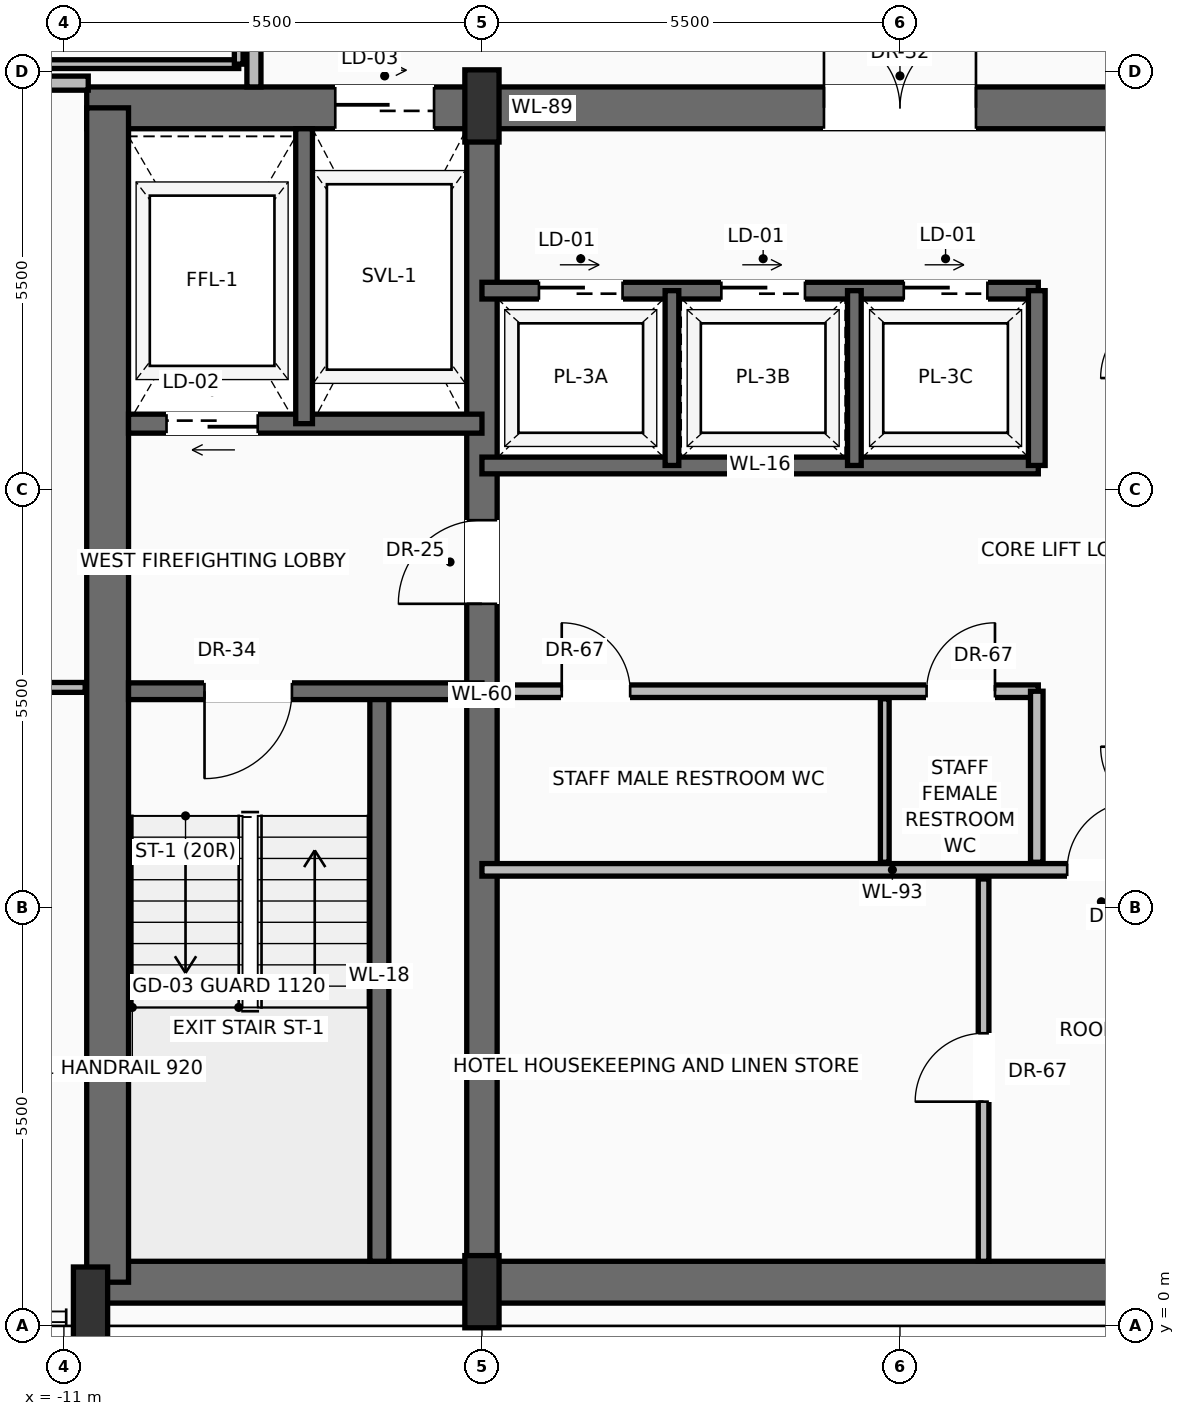
"""IFC4 building model, lengths in metres.
Left out: names, types, materials, properties, quantities, classifications, styles, units other than length and angle.
Written with IfcOpenShell. Run it as: python <this file> out.ifc"""

import sys

from ifc_helpers import new_model, si_unit, direction, frame, frame_2d, origin, origin_2d, place, context, subcontext, project, spatial, rectangle, extrude, source, transform, mapped, element, fill, save


model = new_model("IFC4")
c1 = context("Model", 3, precision=1e-05, world=origin(), true_north=direction((0.0, 1.0)))
c2 = subcontext(c1, "Body", "Model", "MODEL_VIEW")
j1 = project(units=[si_unit("LENGTHUNIT", "METRE"), si_unit("PLANEANGLEUNIT", "RADIAN")], contexts=[c1])
p1 = place(None, origin())
s1 = spatial("IfcSite", under=j1, at=p1, CompositionType="ELEMENT")
p2 = place(p1, origin())
s2 = spatial("IfcBuilding", under=s1, at=p2, CompositionType="ELEMENT")
p3 = place(p2, frame((0.0, 0.0, 223.45)))
s3 = spatial("IfcBuildingStorey", under=s2, at=p3, CompositionType="ELEMENT", Elevation=223.45)
p4 = place(p3, frame((-10.65, 0.575, 0.0), z_axis=(0.0, 0.0, 1.0), x_axis=(1.0, 0.0, 0.0)))
e1 = element("IfcWall", 1, at=p4, inside=s3, PredefinedType="SHEAR", context=c2, shape_type="SweptSolid", body=[
    extrude(rectangle(XDim=21.3, YDim=0.55, at=frame_2d((10.65, 0.0))), origin(), (0.0, 0.0, 1.0), 3.24),
])
p5 = place(p3, frame((-10.7, 16.025, 0.0), z_axis=(0.0, 0.0, 1.0), x_axis=(1.0, 0.0, 0.0)))
e2 = element("IfcWall", 2, at=p5, inside=s3, PredefinedType="SHEAR", context=c2, shape_type="SweptSolid", body=[
    extrude(rectangle(XDim=21.4, YDim=0.55, at=frame_2d((10.7, 0.0))), origin(), (0.0, 0.0, 1.0), 3.24),
])
p6 = place(p5, frame((3.27, 0.0, 0.0)))
e3 = element("IfcOpeningElement", 3, at=p6, cuts=e2, PredefinedType="OPENING", context=c2, shape_type="SweptSolid", body=[
    extrude(rectangle(XDim=1.3, YDim=2.3, at=frame_2d((0.65, 1.15))), frame((0.0, 0.285, 0.0), z_axis=(0.0, -1.0, 0.0), x_axis=(1.0, 0.0, 0.0)), (0.0, 0.0, 1.0), 0.57),
])
p7 = place(p5, frame((9.7, 0.0, 0.0)))
e4 = element("IfcOpeningElement", 4, at=p7, cuts=e2, PredefinedType="OPENING", context=c2, shape_type="SweptSolid", body=[
    extrude(rectangle(XDim=2.0, YDim=2.4, at=frame_2d((1.0, 1.2))), frame((0.0, 0.285, 0.0), z_axis=(0.0, -1.0, 0.0), x_axis=(1.0, 0.0, 0.0)), (0.0, 0.0, 1.0), 0.57),
])
p8 = place(p3, frame((-10.425, 0.575, 0.0), z_axis=(0.0, 0.0, 1.0), x_axis=(0.0, 1.0, 0.0)))
e5 = element("IfcWall", 5, at=p8, inside=s3, PredefinedType="SHEAR", context=c2, shape_type="SweptSolid", body=[
    extrude(rectangle(XDim=15.45, YDim=0.55, at=frame_2d((7.725, 0.0))), origin(), (0.0, 0.0, 1.0), 3.24),
])
p9 = place(p3, frame((-5.5, 0.575, 0.0), z_axis=(0.0, 0.0, 1.0), x_axis=(0.0, 1.0, 0.0)))
e6 = element("IfcWall", 6, at=p9, inside=s3, PredefinedType="SHEAR", context=c2, shape_type="SweptSolid", body=[
    extrude(rectangle(XDim=15.45, YDim=0.4, at=frame_2d((7.725, 0.0))), origin(), (0.0, 0.0, 1.0), 3.24),
])
p10 = place(p9, frame((8.925, 0.0, 0.0)))
e7 = element("IfcOpeningElement", 7, at=p10, cuts=e6, PredefinedType="OPENING", context=c2, shape_type="SweptSolid", body=[
    extrude(rectangle(XDim=1.1, YDim=2.2, at=frame_2d((0.55, 1.1))), frame((0.0, 0.21, 0.0), z_axis=(0.0, -1.0, 0.0), x_axis=(1.0, 0.0, 0.0)), (0.0, 0.0, 1.0), 0.42),
])
m1 = source(origin(), c2, "Body", "SweptSolid", [
    extrude(rectangle(XDim=0.45, YDim=0.95, at=origin_2d()), origin(), (0.0, 0.0, 1.0), 3.45),
])
for number, where, z_axis, x_axis in (
    (8, (-10.65, 0.3, 0.0), (0.0, 0.0, 1.0), (1.0, 0.0, 0.0)),
    (9, (-5.5, 0.45, 0.0), (0.0, 0.0, 1.0), (1.0, 0.0, 0.0)),
    (10, (-5.5, 16.05, 0.0), (0.0, 0.0, 1.0), (1.0, 0.0, 0.0)),
):
    element("IfcColumn", number, at=place(p3, frame(where, z_axis=z_axis, x_axis=x_axis)), inside=s3, PredefinedType="PILASTER", context=c2, shape_type="MappedRepresentation", body=[
        mapped(m1, transform((0.0, 0.0, 0.0), scale=1.0)),
    ])
p11 = place(p3, frame((-19.736, 15.464, 0.0), z_axis=(0.0, 0.0, 1.0), x_axis=(0.513136432844, 0.858307055364, 0.0)))
e11 = element("IfcWall", 11, at=p11, inside=s3, PredefinedType="SOLIDWALL", context=c2, shape_type="SweptSolid", body=[
    extrude(rectangle(XDim=19.37, YDim=0.28, at=frame_2d((9.685, 0.0))), origin(), (0.0, 0.0, 1.0), 2.82),
])
p12 = place(p11, frame((4.649, 0.0, 0.0)))
e12 = element("IfcOpeningElement", 12, at=p12, cuts=e11, PredefinedType="OPENING", context=c2, shape_type="SweptSolid", body=[
    extrude(rectangle(XDim=1.6, YDim=2.35, at=frame_2d((0.8, 1.175))), frame((0.0, 0.15, 0.0), z_axis=(0.0, -1.0, 0.0), x_axis=(1.0, 0.0, 0.0)), (0.0, 0.0, 1.0), 0.3),
])
p13 = place(p11, frame((13.171, 0.0, 0.9)))
e13 = element("IfcOpeningElement", 13, at=p13, cuts=e11, PredefinedType="OPENING", context=c2, shape_type="SweptSolid", body=[
    extrude(rectangle(XDim=1.55, YDim=1.75, at=frame_2d((0.775, 0.875))), frame((0.0, 0.15, 0.0), z_axis=(0.0, -1.0, 0.0), x_axis=(1.0, 0.0, 0.0)), (0.0, 0.0, 1.0), 0.3),
])
p14 = place(p3, frame((-6.85, 0.85, 0.0), z_axis=(0.0, 0.0, 1.0), x_axis=(0.0, 1.0, 0.0)))
e14 = element("IfcWall", 14, at=p14, inside=s3, PredefinedType="SOLIDWALL", context=c2, shape_type="SweptSolid", body=[
    extrude(rectangle(XDim=7.5, YDim=0.25, at=frame_2d((3.75, 0.0))), origin(), (0.0, 0.0, 1.0), 3.24),
])
p15 = place(p3, frame((-5.5, 8.35, 0.0), z_axis=(0.0, 0.0, 1.0), x_axis=(-1.0, 0.0, 0.0)))
e15 = element("IfcWall", 15, at=p15, inside=s3, PredefinedType="SOLIDWALL", context=c2, shape_type="SweptSolid", body=[
    extrude(rectangle(XDim=4.65, YDim=0.22, at=frame_2d((2.325, 0.0))), origin(), (0.0, 0.0, 1.0), 3.24),
])
p16 = place(p15, frame((2.5, 0.0, 0.0)))
e16 = element("IfcOpeningElement", 16, at=p16, cuts=e15, PredefinedType="OPENING", context=c2, shape_type="SweptSolid", body=[
    extrude(rectangle(XDim=1.15, YDim=2.2, at=frame_2d((0.575, 1.1))), frame((0.0, 0.12, 0.0), z_axis=(0.0, -1.0, 0.0), x_axis=(1.0, 0.0, 0.0)), (0.0, 0.0, 1.0), 0.24),
])
p17 = place(p3, frame((-5.5, 11.87, 0.0), z_axis=(0.0, 0.0, 1.0), x_axis=(-1.0, 0.0, 0.0)))
e17 = element("IfcWall", 17, at=p17, inside=s3, PredefinedType="SOLIDWALL", context=c2, shape_type="SweptSolid", body=[
    extrude(rectangle(XDim=4.65, YDim=0.25, at=frame_2d((2.325, 0.0))), origin(), (0.0, 0.0, 1.0), 3.24),
])
p18 = place(p17, frame((2.95, 0.0, 0.0)))
e18 = element("IfcOpeningElement", 18, at=p18, cuts=e17, PredefinedType="OPENING", context=c2, shape_type="SweptSolid", body=[
    extrude(rectangle(XDim=1.2, YDim=2.25, at=frame_2d((0.6, 1.125))), frame((0.0, 0.135, 0.0), z_axis=(0.0, -1.0, 0.0), x_axis=(1.0, 0.0, 0.0)), (0.0, 0.0, 1.0), 0.27),
])
p19 = place(p3, frame((-7.84, 11.87, 0.0), z_axis=(0.0, 0.0, 1.0), x_axis=(0.0, 1.0, 0.0)))
e19 = element("IfcWall", 19, at=p19, inside=s3, PredefinedType="SOLIDWALL", context=c2, shape_type="SweptSolid", body=[
    extrude(rectangle(XDim=3.88, YDim=0.22, at=frame_2d((1.94, 0.0))), origin(), (0.0, 0.0, 1.0), 3.24),
])
p20 = place(p3, frame((-5.5, 6.0, 0.0), z_axis=(0.0, 0.0, 1.0), x_axis=(1.0, 0.0, 0.0)))
e20 = element("IfcWall", 20, at=p20, inside=s3, PredefinedType="PARTITIONING", context=c2, shape_type="SweptSolid", body=[
    extrude(rectangle(XDim=10.8, YDim=0.165, at=frame_2d((5.4, 0.0))), origin(), (0.0, 0.0, 1.0), 3.232),
])
p21 = place(p20, frame((7.7, 0.0, 0.0)))
e21 = element("IfcOpeningElement", 21, at=p21, cuts=e20, PredefinedType="OPENING", context=c2, shape_type="SweptSolid", body=[
    extrude(rectangle(XDim=0.9, YDim=2.1, at=frame_2d((0.45, 1.05))), frame((0.0, 0.093, 0.0), z_axis=(0.0, -1.0, 0.0), x_axis=(1.0, 0.0, 0.0)), (0.0, 0.0, 1.0), 0.185),
])
p22 = place(p3, frame((1.1, 0.85, 0.0), z_axis=(0.0, 0.0, 1.0), x_axis=(0.0, 1.0, 0.0)))
e22 = element("IfcWall", 22, at=p22, inside=s3, PredefinedType="PARTITIONING", context=c2, shape_type="SweptSolid", body=[
    extrude(rectangle(XDim=5.03, YDim=0.14, at=frame_2d((2.515, 0.0))), origin(), (0.0, 0.0, 1.0), 3.232),
])
p23 = place(p22, frame((2.1, 0.0, 0.0)))
e23 = element("IfcOpeningElement", 23, at=p23, cuts=e22, PredefinedType="OPENING", context=c2, shape_type="SweptSolid", body=[
    extrude(rectangle(XDim=0.9, YDim=2.1, at=frame_2d((0.45, 1.05))), frame((0.0, 0.08, 0.0), z_axis=(0.0, -1.0, 0.0), x_axis=(1.0, 0.0, 0.0)), (0.0, 0.0, 1.0), 0.16),
])
p24 = place(p3, frame((-5.3, 8.35, 0.0), z_axis=(0.0, 0.0, 1.0), x_axis=(1.0, 0.0, 0.0)))
e24 = element("IfcWall", 24, at=p24, inside=s3, PredefinedType="PARTITIONING", context=c2, shape_type="SweptSolid", body=[
    extrude(rectangle(XDim=7.12, YDim=0.165, at=frame_2d((3.56, 0.0))), origin(), (0.0, 0.0, 1.0), 3.232),
])
p25 = place(p24, frame((0.85, 0.0, 0.0)))
e25 = element("IfcOpeningElement", 25, at=p25, cuts=e24, PredefinedType="OPENING", context=c2, shape_type="SweptSolid", body=[
    extrude(rectangle(XDim=0.9, YDim=2.1, at=frame_2d((0.45, 1.05))), frame((0.0, 0.093, 0.0), z_axis=(0.0, -1.0, 0.0), x_axis=(1.0, 0.0, 0.0)), (0.0, 0.0, 1.0), 0.185),
])
p26 = place(p24, frame((5.65, 0.0, 0.0)))
e26 = element("IfcOpeningElement", 26, at=p26, cuts=e24, PredefinedType="OPENING", context=c2, shape_type="SweptSolid", body=[
    extrude(rectangle(XDim=0.9, YDim=2.1, at=frame_2d((0.45, 1.05))), frame((0.0, 0.093, 0.0), z_axis=(0.0, -1.0, 0.0), x_axis=(1.0, 0.0, 0.0)), (0.0, 0.0, 1.0), 0.185),
])
p27 = place(p3, frame((1.8, 6.1, 0.0), z_axis=(0.0, 0.0, 1.0), x_axis=(0.0, 1.0, 0.0)))
e27 = element("IfcWall", 27, at=p27, inside=s3, PredefinedType="PARTITIONING", context=c2, shape_type="SweptSolid", body=[
    extrude(rectangle(XDim=2.25, YDim=0.165, at=frame_2d((1.125, 0.0))), origin(), (0.0, 0.0, 1.0), 3.232),
])
p28 = place(p3, frame((-0.2, 6.1, 0.0), z_axis=(0.0, 0.0, 1.0), x_axis=(0.0, 1.0, 0.0)))
e28 = element("IfcWall", 28, at=p28, inside=s3, PredefinedType="PARTITIONING", context=c2, shape_type="SweptSolid", body=[
    extrude(rectangle(XDim=2.15, YDim=0.115, at=frame_2d((1.075, 0.0))), origin(), (0.0, 0.0, 1.0), 3.232),
])
p29 = place(p3, frame((-5.5, 11.32, 0.0), z_axis=(0.0, 0.0, 1.0), x_axis=(1.0, 0.0, 0.0)))
e29 = element("IfcWall", 29, at=p29, inside=s3, PredefinedType="SOLIDWALL", context=c2, shape_type="SweptSolid", body=[
    extrude(rectangle(XDim=7.32, YDim=0.22, at=frame_2d((3.66, 0.0))), origin(), (0.0, 0.0, 1.0), 3.24),
])
p30 = place(p3, frame((-5.5, 13.62, 0.0), z_axis=(0.0, 0.0, 1.0), x_axis=(1.0, 0.0, 0.0)))
e30 = element("IfcWall", 30, at=p30, inside=s3, PredefinedType="SOLIDWALL", context=c2, shape_type="SweptSolid", body=[
    extrude(rectangle(XDim=7.32, YDim=0.22, at=frame_2d((3.66, 0.0))), origin(), (0.0, 0.0, 1.0), 3.24),
])
p31 = place(p30, frame((0.75, 0.0, 0.0)))
e31 = element("IfcOpeningElement", 31, at=p31, cuts=e30, PredefinedType="OPENING", context=c2, shape_type="SweptSolid", body=[
    extrude(rectangle(XDim=1.1, YDim=2.2, at=frame_2d((0.55, 1.1))), frame((0.0, 0.12, 0.0), z_axis=(0.0, -1.0, 0.0), x_axis=(1.0, 0.0, 0.0)), (0.0, 0.0, 1.0), 0.24),
])
p32 = place(p30, frame((3.15, 0.0, 0.0)))
e32 = element("IfcOpeningElement", 32, at=p32, cuts=e30, PredefinedType="OPENING", context=c2, shape_type="SweptSolid", body=[
    extrude(rectangle(XDim=1.1, YDim=2.2, at=frame_2d((0.55, 1.1))), frame((0.0, 0.12, 0.0), z_axis=(0.0, -1.0, 0.0), x_axis=(1.0, 0.0, 0.0)), (0.0, 0.0, 1.0), 0.24),
])
p33 = place(p30, frame((5.55, 0.0, 0.0)))
e33 = element("IfcOpeningElement", 33, at=p33, cuts=e30, PredefinedType="OPENING", context=c2, shape_type="SweptSolid", body=[
    extrude(rectangle(XDim=1.1, YDim=2.2, at=frame_2d((0.55, 1.1))), frame((0.0, 0.12, 0.0), z_axis=(0.0, -1.0, 0.0), x_axis=(1.0, 0.0, 0.0)), (0.0, 0.0, 1.0), 0.24),
])
p34 = place(p3, frame((1.8, 11.32, 0.0), z_axis=(0.0, 0.0, 1.0), x_axis=(0.0, 1.0, 0.0)))
e34 = element("IfcWall", 34, at=p34, inside=s3, PredefinedType="SOLIDWALL", context=c2, shape_type="SweptSolid", body=[
    extrude(rectangle(XDim=2.3, YDim=0.22, at=frame_2d((1.15, 0.0))), origin(), (0.0, 0.0, 1.0), 3.24),
])
for number, where, z_axis, x_axis in (
    (35, (-3.0, 11.32, 0.0), (0.0, 0.0, 1.0), (0.0, 1.0, 0.0)),
    (36, (-0.6, 11.32, 0.0), (0.0, 0.0, 1.0), (0.0, 1.0, 0.0)),
):
    element("IfcWall", number, at=place(p3, frame(where, z_axis=z_axis, x_axis=x_axis)), inside=s3, PredefinedType="SOLIDWALL", context=c2, shape_type="SweptSolid", body=[
        extrude(rectangle(XDim=2.3, YDim=0.18, at=frame_2d((1.15, 0.0))), origin(), (0.0, 0.0, 1.0), 3.24),
    ])
p35 = place(p3, frame((-8.5, 16.3, 0.0), z_axis=(0.0, 0.0, 1.0), x_axis=(0.0, 1.0, 0.0)))
e37 = element("IfcWall", 37, at=p35, inside=s3, PredefinedType="PARTITIONING", context=c2, shape_type="SweptSolid", body=[
    extrude(rectangle(XDim=13.3, YDim=0.185, at=frame_2d((6.65, 0.0))), origin(), (0.0, 0.0, 1.0), 3.232),
])
p36 = place(p35, frame((3.136, 0.0, 0.0)))
e38 = element("IfcOpeningElement", 38, at=p36, cuts=e37, PredefinedType="OPENING", context=c2, shape_type="SweptSolid", body=[
    extrude(rectangle(XDim=1.05, YDim=2.25, at=frame_2d((0.525, 1.125))), frame((0.0, 0.103, 0.0), z_axis=(0.0, -1.0, 0.0), x_axis=(1.0, 0.0, 0.0)), (0.0, 0.0, 1.0), 0.205),
])
p37 = place(p35, frame((9.256, 0.0, 0.0)))
e39 = element("IfcOpeningElement", 39, at=p37, cuts=e37, PredefinedType="OPENING", context=c2, shape_type="SweptSolid", body=[
    extrude(rectangle(XDim=1.05, YDim=2.25, at=frame_2d((0.525, 1.125))), frame((0.0, 0.103, 0.0), z_axis=(0.0, -1.0, 0.0), x_axis=(1.0, 0.0, 0.0)), (0.0, 0.0, 1.0), 0.205),
])
p38 = place(p3, frame((-19.358, 16.35, 0.0), z_axis=(0.0, 0.0, 1.0), x_axis=(1.0, 0.0, 0.0)))
e40 = element("IfcWall", 40, at=p38, inside=s3, PredefinedType="PARTITIONING", context=c2, shape_type="SweptSolid", body=[
    extrude(rectangle(XDim=8.678, YDim=0.185, at=frame_2d((4.339, 0.0))), origin(), (0.0, 0.0, 1.0), 3.232),
])
p39 = place(p38, frame((5.013, 0.0, 0.0)))
e41 = element("IfcOpeningElement", 41, at=p39, cuts=e40, PredefinedType="OPENING", context=c2, shape_type="SweptSolid", body=[
    extrude(rectangle(XDim=1.05, YDim=2.25, at=frame_2d((0.525, 1.125))), frame((0.0, 0.103, 0.0), z_axis=(0.0, -1.0, 0.0), x_axis=(1.0, 0.0, 0.0)), (0.0, 0.0, 1.0), 0.205),
])
p40 = place(p3, frame((-24.111, 8.4, 0.0), z_axis=(0.0, 0.0, 1.0), x_axis=(1.0, 0.0, 0.0)))
e42 = element("IfcWall", 42, at=p40, inside=s3, PredefinedType="PARTITIONING", context=c2, shape_type="SweptSolid", body=[
    extrude(rectangle(XDim=13.391, YDim=0.13, at=frame_2d((6.695, 0.0))), origin(), (0.0, 0.0, 1.0), 3.232),
])
p41 = place(p40, frame((5.585, 0.0, 0.0)))
e43 = element("IfcOpeningElement", 43, at=p41, cuts=e42, PredefinedType="OPENING", context=c2, shape_type="SweptSolid", body=[
    extrude(rectangle(XDim=0.95, YDim=2.2, at=frame_2d((0.475, 1.1))), frame((0.0, 0.075, 0.0), z_axis=(0.0, -1.0, 0.0), x_axis=(1.0, 0.0, 0.0)), (0.0, 0.0, 1.0), 0.15),
])
p42 = place(p3, frame((-11.35, 16.6, 0.0), z_axis=(0.0, 0.0, 1.0), x_axis=(1.0, 0.0, 0.0)))
e44 = element("IfcWall", 44, at=p42, inside=s3, PredefinedType="PARTITIONING", context=c2, shape_type="SweptSolid", body=[
    extrude(rectangle(XDim=2.65, YDim=0.115, at=frame_2d((1.325, 0.0))), origin(), (0.0, 0.0, 1.0), 3.232),
])
p43 = place(p3, frame((-8.7, 16.6, 0.0), z_axis=(0.0, 0.0, 1.0), x_axis=(0.0, 1.0, 0.0)))
e45 = element("IfcWall", 45, at=p43, inside=s3, PredefinedType="PARTITIONING", context=c2, shape_type="SweptSolid", body=[
    extrude(rectangle(XDim=2.4, YDim=0.115, at=frame_2d((1.2, 0.0))), origin(), (0.0, 0.0, 1.0), 3.232),
])
m2 = source(origin(), c2, "Body", "SweptSolid", [
    extrude(rectangle(XDim=1.15, YDim=2.2, at=frame_2d((0.575, 1.1))), frame((0.0, 0.025, 0.0), z_axis=(0.0, -1.0, 0.0), x_axis=(1.0, 0.0, 0.0)), (0.0, 0.0, 1.0), 0.05),
])
p44 = place(p16, origin())
e46 = element("IfcDoor", 46, at=p44, inside=s3, OperationType="SINGLE_SWING_RIGHT", PredefinedType="DOOR", context=c2, shape_type="MappedRepresentation", body=[
    mapped(m2, transform((0.0, 0.0, 0.0), scale=1.0)),
])
fill(e16, e46)
m3 = source(origin(), c2, "Body", "SweptSolid", [
    extrude(rectangle(XDim=1.1, YDim=2.2, at=frame_2d((0.55, 1.1))), frame((0.0, 0.025, 0.0), z_axis=(0.0, -1.0, 0.0), x_axis=(1.0, 0.0, 0.0)), (0.0, 0.0, 1.0), 0.05),
])
p45 = place(p10, origin())
e47 = element("IfcDoor", 47, at=p45, inside=s3, OperationType="SINGLE_SWING_LEFT", PredefinedType="DOOR", context=c2, shape_type="MappedRepresentation", body=[
    mapped(m3, transform((0.0, 0.0, 0.0), scale=1.0)),
])
fill(e7, e47)
m4 = source(origin(), c2, "Body", "SweptSolid", [
    extrude(rectangle(XDim=1.2, YDim=2.25, at=frame_2d((0.6, 1.125))), frame((0.0, 0.025, 0.0), z_axis=(0.0, -1.0, 0.0), x_axis=(1.0, 0.0, 0.0)), (0.0, 0.0, 1.0), 0.05),
])
p46 = place(p18, origin())
e48 = element("IfcDoor", 48, at=p46, inside=s3, OperationType="SLIDING_TO_LEFT", PredefinedType="DOOR", context=c2, shape_type="MappedRepresentation", body=[
    mapped(m4, transform((0.0, 0.0, 0.0), scale=1.0)),
])
fill(e18, e48)
m5 = source(origin(), c2, "Body", "SweptSolid", [
    extrude(rectangle(XDim=1.3, YDim=2.3, at=frame_2d((0.65, 1.15))), frame((0.0, 0.025, 0.0), z_axis=(0.0, -1.0, 0.0), x_axis=(1.0, 0.0, 0.0)), (0.0, 0.0, 1.0), 0.05),
])
p47 = place(p6, origin())
e49 = element("IfcDoor", 49, at=p47, inside=s3, OperationType="SLIDING_TO_RIGHT", PredefinedType="DOOR", context=c2, shape_type="MappedRepresentation", body=[
    mapped(m5, transform((0.0, 0.0, 0.0), scale=1.0)),
])
fill(e3, e49)
m6 = source(origin(), c2, "Body", "SweptSolid", [
    extrude(rectangle(XDim=2.0, YDim=2.4, at=frame_2d((1.0, 1.2))), frame((0.0, 0.025, 0.0), z_axis=(0.0, -1.0, 0.0), x_axis=(1.0, 0.0, 0.0)), (0.0, 0.0, 1.0), 0.05),
])
p48 = place(p7, origin())
e50 = element("IfcDoor", 50, at=p48, inside=s3, OperationType="DOUBLE_DOOR_SINGLE_SWING", PredefinedType="DOOR", context=c2, shape_type="MappedRepresentation", body=[
    mapped(m6, transform((0.0, 0.0, 0.0), scale=1.0)),
])
fill(e4, e50)
m7 = source(origin(), c2, "Body", "SweptSolid", [
    extrude(rectangle(XDim=0.9, YDim=2.1, at=frame_2d((0.45, 1.05))), frame((0.0, 0.025, 0.0), z_axis=(0.0, -1.0, 0.0), x_axis=(1.0, 0.0, 0.0)), (0.0, 0.0, 1.0), 0.05),
])
p49 = place(p21, origin())
e51 = element("IfcDoor", 51, at=p49, inside=s3, OperationType="SINGLE_SWING_RIGHT", PredefinedType="DOOR", context=c2, shape_type="MappedRepresentation", body=[
    mapped(m7, transform((0.0, 0.0, 0.0), scale=1.0)),
])
fill(e21, e51)
p50 = place(p23, origin())
e52 = element("IfcDoor", 52, at=p50, inside=s3, OperationType="SINGLE_SWING_LEFT", PredefinedType="DOOR", context=c2, shape_type="MappedRepresentation", body=[
    mapped(m7, transform((0.0, 0.0, 0.0), scale=1.0)),
])
fill(e23, e52)
p51 = place(p25, origin())
e53 = element("IfcDoor", 53, at=p51, inside=s3, OperationType="SINGLE_SWING_LEFT", PredefinedType="DOOR", context=c2, shape_type="MappedRepresentation", body=[
    mapped(m7, transform((0.0, 0.0, 0.0), scale=1.0)),
])
fill(e25, e53)
p52 = place(p26, origin())
e54 = element("IfcDoor", 54, at=p52, inside=s3, OperationType="SINGLE_SWING_RIGHT", PredefinedType="DOOR", context=c2, shape_type="MappedRepresentation", body=[
    mapped(m7, transform((0.0, 0.0, 0.0), scale=1.0)),
])
fill(e26, e54)
m8 = source(origin(), c2, "Body", "SweptSolid", [
    extrude(rectangle(XDim=1.1, YDim=2.2, at=frame_2d((0.55, 1.1))), frame((0.0, 0.025, 0.0), z_axis=(0.0, -1.0, 0.0), x_axis=(1.0, 0.0, 0.0)), (0.0, 0.0, 1.0), 0.05),
])
p53 = place(p31, origin())
e55 = element("IfcDoor", 55, at=p53, inside=s3, OperationType="SLIDING_TO_RIGHT", PredefinedType="DOOR", context=c2, shape_type="MappedRepresentation", body=[
    mapped(m8, transform((0.0, 0.0, 0.0), scale=1.0)),
])
fill(e31, e55)
p54 = place(p32, origin())
e56 = element("IfcDoor", 56, at=p54, inside=s3, OperationType="SLIDING_TO_RIGHT", PredefinedType="DOOR", context=c2, shape_type="MappedRepresentation", body=[
    mapped(m8, transform((0.0, 0.0, 0.0), scale=1.0)),
])
fill(e32, e56)
p55 = place(p33, origin())
e57 = element("IfcDoor", 57, at=p55, inside=s3, OperationType="SLIDING_TO_RIGHT", PredefinedType="DOOR", context=c2, shape_type="MappedRepresentation", body=[
    mapped(m8, transform((0.0, 0.0, 0.0), scale=1.0)),
])
fill(e33, e57)
save(model, sys.argv[1])
